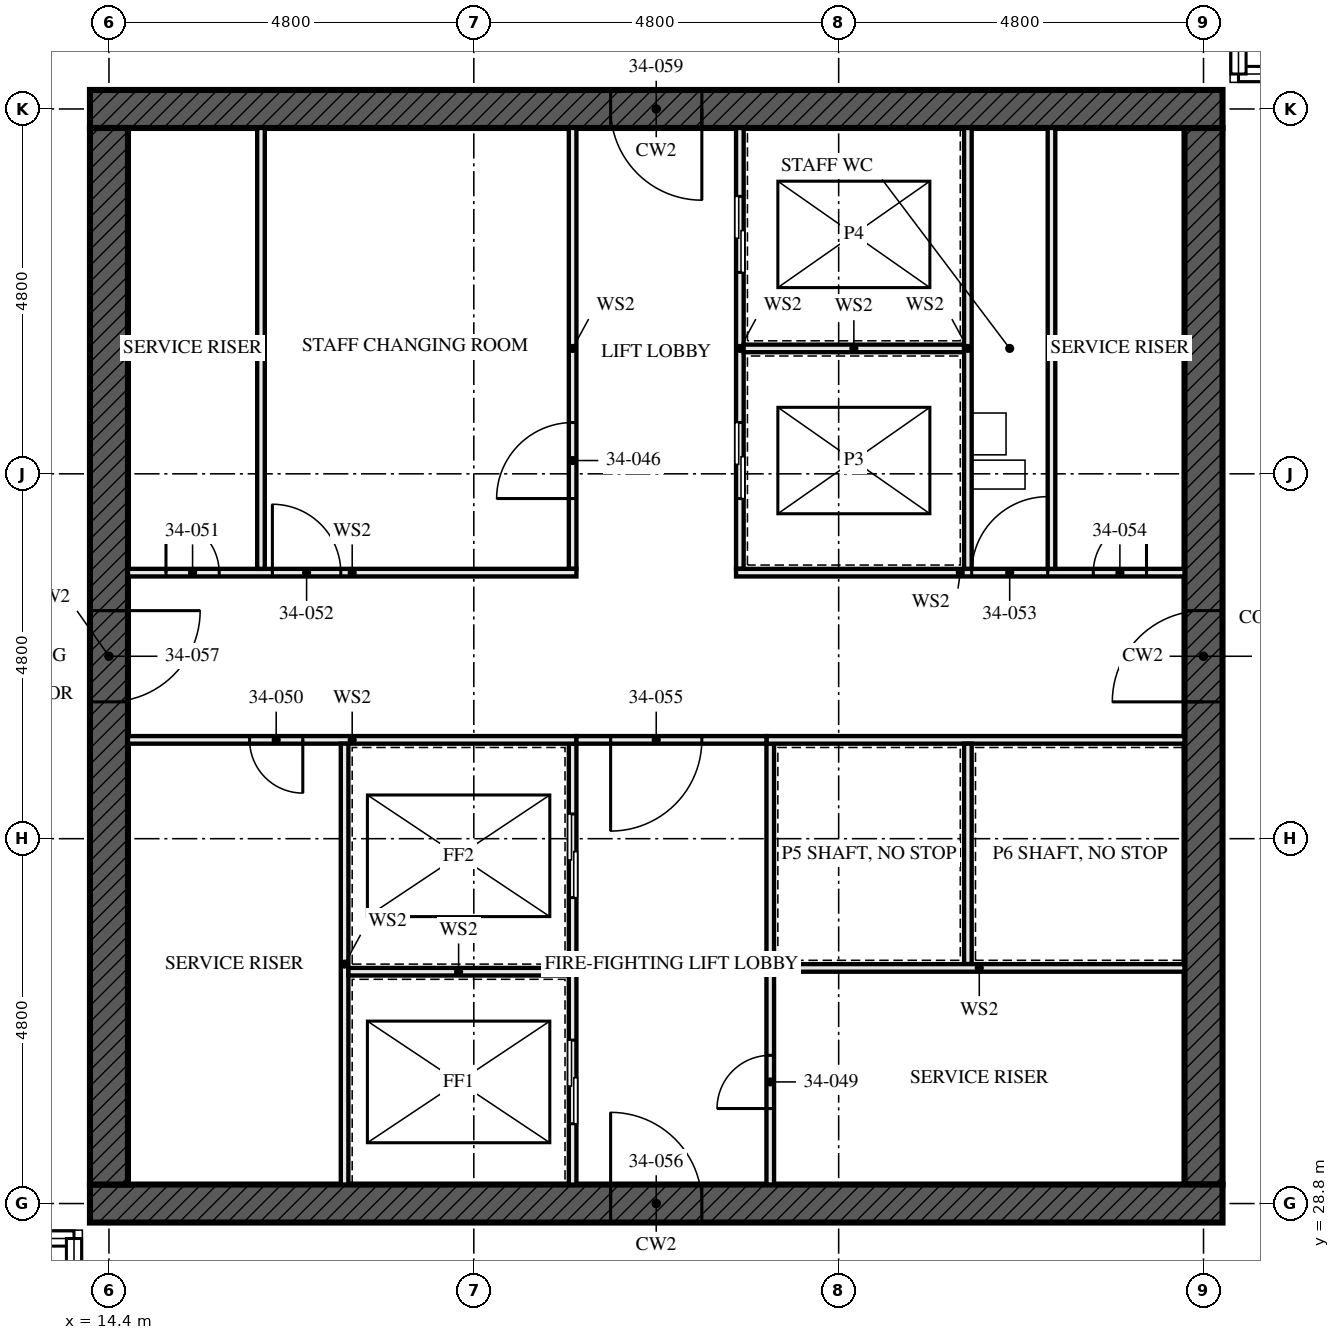
"""IFC4 building model, lengths in metres.
Left out: names, types, materials, properties, quantities, classifications, styles, units other than length and angle.
Written with IfcOpenShell. Run it as: python <this file> out.ifc"""

import sys

from ifc_helpers import new_model, si_unit, direction, frame, frame_2d, origin, place, context, subcontext, project, spatial, rectangle, extrude, element, fill, save


model = new_model("IFC4")
c1 = context("Model", 3, precision=1e-05, world=origin(), true_north=direction((0.0, 1.0)))
c2 = subcontext(c1, "Body", "Model", "MODEL_VIEW")
j1 = project(units=[si_unit("LENGTHUNIT", "METRE"), si_unit("PLANEANGLEUNIT", "RADIAN")], contexts=[c1])
p1 = place(None, origin())
s1 = spatial("IfcSite", under=j1, at=p1, CompositionType="ELEMENT")
p2 = place(p1, origin())
s2 = spatial("IfcBuilding", under=s1, at=p2, CompositionType="ELEMENT")
p3 = place(p2, frame((0.0, 0.0, 126.0)))
s3 = spatial("IfcBuildingStorey", under=s2, at=p3, CompositionType="ELEMENT", Elevation=126.0)
p4 = place(p3, frame((14.15, 28.8, -0.17), z_axis=(0.0, 0.0, 1.0), x_axis=(1.0, 0.0, 0.0)))
e1 = element("IfcWall", 1, at=p4, inside=s3, PredefinedType="SHEAR", context=c2, shape_type="SweptSolid", body=[
    extrude(rectangle(XDim=14.9, YDim=0.5, at=frame_2d((7.45, 0.0))), origin(), (0.0, 0.0, 1.0), 3.5),
])
p5 = place(p4, frame((6.85, 0.0, 0.17)))
e2 = element("IfcOpeningElement", 2, at=p5, cuts=e1, PredefinedType="OPENING", context=c2, shape_type="SweptSolid", body=[
    extrude(rectangle(XDim=1.2, YDim=2.1, at=frame_2d((0.6, 1.05))), frame((0.0, 0.26, 0.0), z_axis=(0.0, -1.0, 0.0), x_axis=(1.0, 0.0, 0.0)), (0.0, 0.0, 1.0), 0.521),
])
p6 = place(p3, frame((29.05, 43.2, -0.17), z_axis=(0.0, 0.0, 1.0), x_axis=(-1.0, 0.0, 0.0)))
e3 = element("IfcWall", 3, at=p6, inside=s3, PredefinedType="SHEAR", context=c2, shape_type="SweptSolid", body=[
    extrude(rectangle(XDim=14.9, YDim=0.5, at=frame_2d((7.45, 0.0))), origin(), (0.0, 0.0, 1.0), 3.5),
])
p7 = place(p6, frame((6.85, 0.0, 0.17)))
e4 = element("IfcOpeningElement", 4, at=p7, cuts=e3, PredefinedType="OPENING", context=c2, shape_type="SweptSolid", body=[
    extrude(rectangle(XDim=1.2, YDim=2.1, at=frame_2d((0.6, 1.05))), frame((0.0, 0.26, 0.0), z_axis=(0.0, -1.0, 0.0), x_axis=(1.0, 0.0, 0.0)), (0.0, 0.0, 1.0), 0.521),
])
p8 = place(p3, frame((14.4, 42.95, -0.17), z_axis=(0.0, 0.0, 1.0), x_axis=(0.0, -1.0, 0.0)))
e5 = element("IfcWall", 5, at=p8, inside=s3, PredefinedType="SHEAR", context=c2, shape_type="SweptSolid", body=[
    extrude(rectangle(XDim=13.9, YDim=0.5, at=frame_2d((6.95, 0.0))), origin(), (0.0, 0.0, 1.0), 3.5),
])
p9 = place(p8, frame((6.35, 0.0, 0.17)))
e6 = element("IfcOpeningElement", 6, at=p9, cuts=e5, PredefinedType="OPENING", context=c2, shape_type="SweptSolid", body=[
    extrude(rectangle(XDim=1.2, YDim=2.1, at=frame_2d((0.6, 1.05))), frame((0.0, 0.26, 0.0), z_axis=(0.0, -1.0, 0.0), x_axis=(1.0, 0.0, 0.0)), (0.0, 0.0, 1.0), 0.521),
])
p10 = place(p3, frame((28.8, 29.05, -0.17), z_axis=(0.0, 0.0, 1.0), x_axis=(0.0, 1.0, 0.0)))
e7 = element("IfcWall", 7, at=p10, inside=s3, PredefinedType="SHEAR", context=c2, shape_type="SweptSolid", body=[
    extrude(rectangle(XDim=13.9, YDim=0.5, at=frame_2d((6.95, 0.0))), origin(), (0.0, 0.0, 1.0), 3.5),
])
p11 = place(p10, frame((6.35, 0.0, 0.17)))
e8 = element("IfcOpeningElement", 8, at=p11, cuts=e7, PredefinedType="OPENING", context=c2, shape_type="SweptSolid", body=[
    extrude(rectangle(XDim=1.2, YDim=2.1, at=frame_2d((0.6, 1.05))), frame((0.0, 0.26, 0.0), z_axis=(0.0, -1.0, 0.0), x_axis=(1.0, 0.0, 0.0)), (0.0, 0.0, 1.0), 0.521),
])
for number, where, z_axis, x_axis in (
    (9, (16.4, 37.15, 0.0), (0.0, 0.0, 1.0), (0.0, 1.0, 0.0)),
    (10, (26.8, 37.15, 0.0), (0.0, 0.0, 1.0), (0.0, 1.0, 0.0)),
):
    element("IfcWall", number, at=place(p3, frame(where, z_axis=z_axis, x_axis=x_axis)), inside=s3, PredefinedType="SOLIDWALL", context=c2, shape_type="SweptSolid", body=[
        extrude(rectangle(XDim=5.8, YDim=0.1, at=frame_2d((2.9, 0.0))), origin(), (0.0, 0.0, 1.0), 3.33),
    ])
p12 = place(p3, frame((20.5, 29.05, 0.0), z_axis=(0.0, 0.0, 1.0), x_axis=(0.0, 1.0, 0.0)))
e11 = element("IfcWall", 11, at=p12, inside=s3, PredefinedType="SOLIDWALL", context=c2, shape_type="SweptSolid", body=[
    extrude(rectangle(XDim=5.8, YDim=0.1, at=frame_2d((2.9, 0.0))), origin(), (0.0, 0.0, 1.0), 3.33),
])
p13 = place(p12, frame((0.8, 0.0, 0.0)))
e12 = element("IfcOpeningElement", 12, at=p13, cuts=e11, PredefinedType="OPENING", context=c2, shape_type="SweptSolid", body=[
    extrude(rectangle(XDim=1.1, YDim=2.3, at=frame_2d((0.55, 1.15))), frame((0.0, 0.061, 0.0), z_axis=(0.0, -1.0, 0.0), x_axis=(1.0, 0.0, 0.0)), (0.0, 0.0, 1.0), 0.121),
])
p14 = place(p12, frame((3.775, 0.0, 0.0)))
e13 = element("IfcOpeningElement", 13, at=p14, cuts=e11, PredefinedType="OPENING", context=c2, shape_type="SweptSolid", body=[
    extrude(rectangle(XDim=1.1, YDim=2.3, at=frame_2d((0.55, 1.15))), frame((0.0, 0.061, 0.0), z_axis=(0.0, -1.0, 0.0), x_axis=(1.0, 0.0, 0.0)), (0.0, 0.0, 1.0), 0.121),
])
p15 = place(p3, frame((20.5, 37.15, 0.0), z_axis=(0.0, 0.0, 1.0), x_axis=(0.0, 1.0, 0.0)))
e14 = element("IfcWall", 14, at=p15, inside=s3, PredefinedType="SOLIDWALL", context=c2, shape_type="SweptSolid", body=[
    extrude(rectangle(XDim=5.8, YDim=0.1, at=frame_2d((2.9, 0.0))), origin(), (0.0, 0.0, 1.0), 3.33),
])
p16 = place(p15, frame((0.925, 0.0, 0.0)))
e15 = element("IfcOpeningElement", 15, at=p16, cuts=e14, PredefinedType="OPENING", context=c2, shape_type="SweptSolid", body=[
    extrude(rectangle(XDim=1.0, YDim=2.1, at=frame_2d((0.5, 1.05))), frame((0.0, 0.061, 0.0), z_axis=(0.0, -1.0, 0.0), x_axis=(1.0, 0.0, 0.0)), (0.0, 0.0, 1.0), 0.121),
])
p17 = place(p3, frame((22.7, 37.15, 0.0), z_axis=(0.0, 0.0, 1.0), x_axis=(0.0, 1.0, 0.0)))
e16 = element("IfcWall", 16, at=p17, inside=s3, PredefinedType="SOLIDWALL", context=c2, shape_type="SweptSolid", body=[
    extrude(rectangle(XDim=5.8, YDim=0.1, at=frame_2d((2.9, 0.0))), origin(), (0.0, 0.0, 1.0), 3.33),
])
p18 = place(p17, frame((0.925, 0.0, 0.0)))
e17 = element("IfcOpeningElement", 17, at=p18, cuts=e16, PredefinedType="OPENING", context=c2, shape_type="SweptSolid", body=[
    extrude(rectangle(XDim=1.0, YDim=2.1, at=frame_2d((0.5, 1.05))), frame((0.0, 0.061, 0.0), z_axis=(0.0, -1.0, 0.0), x_axis=(1.0, 0.0, 0.0)), (0.0, 0.0, 1.0), 0.121),
])
p19 = place(p17, frame((3.9, 0.0, 0.0)))
e18 = element("IfcOpeningElement", 18, at=p19, cuts=e16, PredefinedType="OPENING", context=c2, shape_type="SweptSolid", body=[
    extrude(rectangle(XDim=1.0, YDim=2.1, at=frame_2d((0.5, 1.05))), frame((0.0, 0.061, 0.0), z_axis=(0.0, -1.0, 0.0), x_axis=(1.0, 0.0, 0.0)), (0.0, 0.0, 1.0), 0.121),
])
p20 = place(p3, frame((23.1, 29.05, 0.0), z_axis=(0.0, 0.0, 1.0), x_axis=(0.0, 1.0, 0.0)))
e19 = element("IfcWall", 19, at=p20, inside=s3, PredefinedType="SOLIDWALL", context=c2, shape_type="SweptSolid", body=[
    extrude(rectangle(XDim=5.8, YDim=0.1, at=frame_2d((2.9, 0.0))), origin(), (0.0, 0.0, 1.0), 3.33),
])
p21 = place(p20, frame((1.0, 0.0, 0.0)))
e20 = element("IfcOpeningElement", 20, at=p21, cuts=e19, PredefinedType="OPENING", context=c2, shape_type="SweptSolid", body=[
    extrude(rectangle(XDim=0.7, YDim=2.1, at=frame_2d((0.35, 1.05))), frame((0.0, 0.061, 0.0), z_axis=(0.0, -1.0, 0.0), x_axis=(1.0, 0.0, 0.0)), (0.0, 0.0, 1.0), 0.121),
])
p22 = place(p3, frame((14.65, 34.9, 0.0), z_axis=(0.0, 0.0, 1.0), x_axis=(1.0, 0.0, 0.0)))
e21 = element("IfcWall", 21, at=p22, inside=s3, PredefinedType="SOLIDWALL", context=c2, shape_type="SweptSolid", body=[
    extrude(rectangle(XDim=5.9, YDim=0.1, at=frame_2d((2.95, 0.0))), origin(), (0.0, 0.0, 1.0), 3.33),
])
p23 = place(p22, frame((1.6, 0.0, 0.0)))
e22 = element("IfcOpeningElement", 22, at=p23, cuts=e21, PredefinedType="OPENING", context=c2, shape_type="SweptSolid", body=[
    extrude(rectangle(XDim=0.7, YDim=2.1, at=frame_2d((0.35, 1.05))), frame((0.0, 0.061, 0.0), z_axis=(0.0, -1.0, 0.0), x_axis=(1.0, 0.0, 0.0)), (0.0, 0.0, 1.0), 0.121),
])
p24 = place(p3, frame((23.05, 34.9, 0.0), z_axis=(0.0, 0.0, 1.0), x_axis=(1.0, 0.0, 0.0)))
e23 = element("IfcWall", 23, at=p24, inside=s3, PredefinedType="SOLIDWALL", context=c2, shape_type="SweptSolid", body=[
    extrude(rectangle(XDim=5.5, YDim=0.1, at=frame_2d((2.75, 0.0))), origin(), (0.0, 0.0, 1.0), 3.33),
])
p25 = place(p3, frame((14.65, 37.1, 0.0), z_axis=(0.0, 0.0, 1.0), x_axis=(1.0, 0.0, 0.0)))
e24 = element("IfcWall", 24, at=p25, inside=s3, PredefinedType="SOLIDWALL", context=c2, shape_type="SweptSolid", body=[
    extrude(rectangle(XDim=5.9, YDim=0.1, at=frame_2d((2.95, 0.0))), origin(), (0.0, 0.0, 1.0), 3.33),
])
p26 = place(p25, frame((0.5, 0.0, 0.0)))
e25 = element("IfcOpeningElement", 25, at=p26, cuts=e24, PredefinedType="OPENING", context=c2, shape_type="SweptSolid", body=[
    extrude(rectangle(XDim=0.7, YDim=2.1, at=frame_2d((0.35, 1.05))), frame((0.0, 0.061, 0.0), z_axis=(0.0, -1.0, 0.0), x_axis=(1.0, 0.0, 0.0)), (0.0, 0.0, 1.0), 0.121),
])
p27 = place(p25, frame((1.9, 0.0, 0.0)))
e26 = element("IfcOpeningElement", 26, at=p27, cuts=e24, PredefinedType="OPENING", context=c2, shape_type="SweptSolid", body=[
    extrude(rectangle(XDim=0.9, YDim=2.1, at=frame_2d((0.45, 1.05))), frame((0.0, 0.061, 0.0), z_axis=(0.0, -1.0, 0.0), x_axis=(1.0, 0.0, 0.0)), (0.0, 0.0, 1.0), 0.121),
])
p28 = place(p3, frame((22.65, 37.1, 0.0), z_axis=(0.0, 0.0, 1.0), x_axis=(1.0, 0.0, 0.0)))
e27 = element("IfcWall", 27, at=p28, inside=s3, PredefinedType="SOLIDWALL", context=c2, shape_type="SweptSolid", body=[
    extrude(rectangle(XDim=5.9, YDim=0.1, at=frame_2d((2.95, 0.0))), origin(), (0.0, 0.0, 1.0), 3.33),
])
p29 = place(p28, frame((3.1, 0.0, 0.0)))
e28 = element("IfcOpeningElement", 28, at=p29, cuts=e27, PredefinedType="OPENING", context=c2, shape_type="SweptSolid", body=[
    extrude(rectangle(XDim=1.0, YDim=2.1, at=frame_2d((0.5, 1.05))), frame((0.0, 0.061, 0.0), z_axis=(0.0, -1.0, 0.0), x_axis=(1.0, 0.0, 0.0)), (0.0, 0.0, 1.0), 0.121),
])
p30 = place(p28, frame((4.7, 0.0, 0.0)))
e29 = element("IfcOpeningElement", 29, at=p30, cuts=e27, PredefinedType="OPENING", context=c2, shape_type="SweptSolid", body=[
    extrude(rectangle(XDim=0.7, YDim=2.1, at=frame_2d((0.35, 1.05))), frame((0.0, 0.061, 0.0), z_axis=(0.0, -1.0, 0.0), x_axis=(1.0, 0.0, 0.0)), (0.0, 0.0, 1.0), 0.121),
])
p31 = place(p3, frame((20.55, 34.9, 0.0), z_axis=(0.0, 0.0, 1.0), x_axis=(1.0, 0.0, 0.0)))
e30 = element("IfcWall", 30, at=p31, inside=s3, PredefinedType="SOLIDWALL", context=c2, shape_type="SweptSolid", body=[
    extrude(rectangle(XDim=2.5, YDim=0.1, at=frame_2d((1.25, 0.0))), origin(), (0.0, 0.0, 1.0), 3.33),
])
p32 = place(p31, frame((0.45, 0.0, 0.0)))
e31 = element("IfcOpeningElement", 31, at=p32, cuts=e30, PredefinedType="OPENING", context=c2, shape_type="SweptSolid", body=[
    extrude(rectangle(XDim=1.2, YDim=2.1, at=frame_2d((0.6, 1.05))), frame((0.0, 0.061, 0.0), z_axis=(0.0, -1.0, 0.0), x_axis=(1.0, 0.0, 0.0)), (0.0, 0.0, 1.0), 0.121),
])
p33 = place(p3, frame((17.5, 29.05, 0.0), z_axis=(0.0, 0.0, 1.0), x_axis=(0.0, 1.0, 0.0)))
e32 = element("IfcWall", 32, at=p33, inside=s3, PredefinedType="SOLIDWALL", context=c2, shape_type="SweptSolid", body=[
    extrude(rectangle(XDim=5.8, YDim=0.1, at=frame_2d((2.9, 0.0))), origin(), (0.0, 0.0, 1.0), 3.33),
])
for number, where, z_axis, x_axis in (
    (33, (17.55, 31.85, 0.0), (0.0, 0.0, 1.0), (1.0, 0.0, 0.0)),
    (34, (22.75, 40.05, 0.0), (0.0, 0.0, 1.0), (1.0, 0.0, 0.0)),
):
    element("IfcWall", number, at=place(p3, frame(where, z_axis=z_axis, x_axis=x_axis)), inside=s3, PredefinedType="SOLIDWALL", context=c2, shape_type="SweptSolid", body=[
        extrude(rectangle(XDim=2.9, YDim=0.1, at=frame_2d((1.45, 0.0))), origin(), (0.0, 0.0, 1.0), 3.33),
    ])
p34 = place(p3, frame((25.7, 37.15, 0.0), z_axis=(0.0, 0.0, 1.0), x_axis=(0.0, 1.0, 0.0)))
e35 = element("IfcWall", 35, at=p34, inside=s3, PredefinedType="SOLIDWALL", context=c2, shape_type="SweptSolid", body=[
    extrude(rectangle(XDim=5.8, YDim=0.1, at=frame_2d((2.9, 0.0))), origin(), (0.0, 0.0, 1.0), 3.33),
])
p35 = place(p3, frame((25.7, 31.95, 0.0), z_axis=(0.0, 0.0, 1.0), x_axis=(0.0, 1.0, 0.0)))
e36 = element("IfcWall", 36, at=p35, inside=s3, PredefinedType="SOLIDWALL", context=c2, shape_type="SweptSolid", body=[
    extrude(rectangle(XDim=2.9, YDim=0.1, at=frame_2d((1.45, 0.0))), origin(), (0.0, 0.0, 1.0), 3.33),
])
p36 = place(p3, frame((23.15, 31.9, 0.0), z_axis=(0.0, 0.0, 1.0), x_axis=(1.0, 0.0, 0.0)))
e37 = element("IfcWall", 37, at=p36, inside=s3, PredefinedType="SOLIDWALL", context=c2, shape_type="SweptSolid", body=[
    extrude(rectangle(XDim=5.4, YDim=0.1, at=frame_2d((2.7, 0.0))), origin(), (0.0, 0.0, 1.0), 3.33),
])
p37 = place(p13, origin())
e38 = element("IfcDoor", 38, at=p37, inside=s3, OperationType="SLIDING_TO_LEFT", PredefinedType="DOOR", context=c2, shape_type="SweptSolid", body=[
    extrude(rectangle(XDim=1.1, YDim=2.3, at=frame_2d((0.55, 1.15))), frame((0.0, 0.05, 0.0), z_axis=(0.0, -1.0, 0.0), x_axis=(1.0, 0.0, 0.0)), (0.0, 0.0, 1.0), 0.1),
])
fill(e12, e38)
p38 = place(p14, origin())
e39 = element("IfcDoor", 39, at=p38, inside=s3, OperationType="SLIDING_TO_LEFT", PredefinedType="DOOR", context=c2, shape_type="SweptSolid", body=[
    extrude(rectangle(XDim=1.1, YDim=2.3, at=frame_2d((0.55, 1.15))), frame((0.0, 0.05, 0.0), z_axis=(0.0, -1.0, 0.0), x_axis=(1.0, 0.0, 0.0)), (0.0, 0.0, 1.0), 0.1),
])
fill(e13, e39)
p39 = place(p16, origin())
e40 = element("IfcDoor", 40, at=p39, inside=s3, OperationType="SINGLE_SWING_RIGHT", PredefinedType="DOOR", context=c2, shape_type="SweptSolid", body=[
    extrude(rectangle(XDim=1.0, YDim=2.1, at=frame_2d((0.5, 1.05))), frame((0.0, 0.027, 0.0), z_axis=(0.0, -1.0, 0.0), x_axis=(1.0, 0.0, 0.0)), (0.0, 0.0, 1.0), 0.054),
])
fill(e15, e40)
p40 = place(p18, origin())
e41 = element("IfcDoor", 41, at=p40, inside=s3, OperationType="SLIDING_TO_LEFT", PredefinedType="DOOR", context=c2, shape_type="SweptSolid", body=[
    extrude(rectangle(XDim=1.0, YDim=2.1, at=frame_2d((0.5, 1.05))), frame((0.0, 0.05, 0.0), z_axis=(0.0, -1.0, 0.0), x_axis=(1.0, 0.0, 0.0)), (0.0, 0.0, 1.0), 0.1),
])
fill(e17, e41)
p41 = place(p19, origin())
e42 = element("IfcDoor", 42, at=p41, inside=s3, OperationType="SLIDING_TO_LEFT", PredefinedType="DOOR", context=c2, shape_type="SweptSolid", body=[
    extrude(rectangle(XDim=1.0, YDim=2.1, at=frame_2d((0.5, 1.05))), frame((0.0, 0.05, 0.0), z_axis=(0.0, -1.0, 0.0), x_axis=(1.0, 0.0, 0.0)), (0.0, 0.0, 1.0), 0.1),
])
fill(e18, e42)
p42 = place(p21, origin())
e43 = element("IfcDoor", 43, at=p42, inside=s3, OperationType="SINGLE_SWING_RIGHT", PredefinedType="DOOR", context=c2, shape_type="SweptSolid", body=[
    extrude(rectangle(XDim=0.7, YDim=2.1, at=frame_2d((0.35, 1.05))), frame((0.0, 0.027, 0.0), z_axis=(0.0, -1.0, 0.0), x_axis=(1.0, 0.0, 0.0)), (0.0, 0.0, 1.0), 0.054),
])
fill(e20, e43)
p43 = place(p23, frame((0.7, 0.0, 0.0), z_axis=(0.0, 0.0, 1.0), x_axis=(-1.0, 0.0, 0.0)))
e44 = element("IfcDoor", 44, at=p43, inside=s3, OperationType="SINGLE_SWING_RIGHT", PredefinedType="DOOR", context=c2, shape_type="SweptSolid", body=[
    extrude(rectangle(XDim=0.7, YDim=2.1, at=frame_2d((0.35, 1.05))), frame((0.0, 0.027, 0.0), z_axis=(0.0, -1.0, 0.0), x_axis=(1.0, 0.0, 0.0)), (0.0, 0.0, 1.0), 0.054),
])
fill(e22, e44)
p44 = place(p26, origin())
e45 = element("IfcDoor", 45, at=p44, inside=s3, OperationType="SINGLE_SWING_RIGHT", PredefinedType="DOOR", context=c2, shape_type="SweptSolid", body=[
    extrude(rectangle(XDim=0.7, YDim=2.1, at=frame_2d((0.35, 1.05))), frame((0.0, 0.027, 0.0), z_axis=(0.0, -1.0, 0.0), x_axis=(1.0, 0.0, 0.0)), (0.0, 0.0, 1.0), 0.054),
])
fill(e25, e45)
p45 = place(p27, origin())
e46 = element("IfcDoor", 46, at=p45, inside=s3, OperationType="SINGLE_SWING_RIGHT", PredefinedType="DOOR", context=c2, shape_type="SweptSolid", body=[
    extrude(rectangle(XDim=0.9, YDim=2.1, at=frame_2d((0.45, 1.05))), frame((0.0, 0.027, 0.0), z_axis=(0.0, -1.0, 0.0), x_axis=(1.0, 0.0, 0.0)), (0.0, 0.0, 1.0), 0.054),
])
fill(e26, e46)
p46 = place(p29, origin())
e47 = element("IfcDoor", 47, at=p46, inside=s3, OperationType="SINGLE_SWING_LEFT", PredefinedType="DOOR", context=c2, shape_type="SweptSolid", body=[
    extrude(rectangle(XDim=1.0, YDim=2.1, at=frame_2d((0.5, 1.05))), frame((0.0, 0.027, 0.0), z_axis=(0.0, -1.0, 0.0), x_axis=(1.0, 0.0, 0.0)), (0.0, 0.0, 1.0), 0.054),
])
fill(e28, e47)
p47 = place(p30, origin())
e48 = element("IfcDoor", 48, at=p47, inside=s3, OperationType="SINGLE_SWING_LEFT", PredefinedType="DOOR", context=c2, shape_type="SweptSolid", body=[
    extrude(rectangle(XDim=0.7, YDim=2.1, at=frame_2d((0.35, 1.05))), frame((0.0, 0.027, 0.0), z_axis=(0.0, -1.0, 0.0), x_axis=(1.0, 0.0, 0.0)), (0.0, 0.0, 1.0), 0.054),
])
fill(e29, e48)
p48 = place(p32, frame((1.2, 0.0, 0.0), z_axis=(0.0, 0.0, 1.0), x_axis=(-1.0, 0.0, 0.0)))
e49 = element("IfcDoor", 49, at=p48, inside=s3, OperationType="SINGLE_SWING_LEFT", PredefinedType="DOOR", context=c2, shape_type="SweptSolid", body=[
    extrude(rectangle(XDim=1.2, YDim=2.1, at=frame_2d((0.6, 1.05))), frame((0.0, 0.027, 0.0), z_axis=(0.0, -1.0, 0.0), x_axis=(1.0, 0.0, 0.0)), (0.0, 0.0, 1.0), 0.054),
])
fill(e31, e49)
p49 = place(p5, origin())
e50 = element("IfcDoor", 50, at=p49, inside=s3, OperationType="SINGLE_SWING_LEFT", PredefinedType="DOOR", context=c2, shape_type="SweptSolid", body=[
    extrude(rectangle(XDim=1.2, YDim=2.1, at=frame_2d((0.6, 1.05))), frame((0.0, 0.027, 0.0), z_axis=(0.0, -1.0, 0.0), x_axis=(1.0, 0.0, 0.0)), (0.0, 0.0, 1.0), 0.054),
])
fill(e2, e50)
p50 = place(p9, origin())
e51 = element("IfcDoor", 51, at=p50, inside=s3, OperationType="SINGLE_SWING_LEFT", PredefinedType="DOOR", context=c2, shape_type="SweptSolid", body=[
    extrude(rectangle(XDim=1.2, YDim=2.1, at=frame_2d((0.6, 1.05))), frame((0.0, 0.027, 0.0), z_axis=(0.0, -1.0, 0.0), x_axis=(1.0, 0.0, 0.0)), (0.0, 0.0, 1.0), 0.054),
])
fill(e6, e51)
p51 = place(p11, origin())
e52 = element("IfcDoor", 52, at=p51, inside=s3, OperationType="SINGLE_SWING_LEFT", PredefinedType="DOOR", context=c2, shape_type="SweptSolid", body=[
    extrude(rectangle(XDim=1.2, YDim=2.1, at=frame_2d((0.6, 1.05))), frame((0.0, 0.027, 0.0), z_axis=(0.0, -1.0, 0.0), x_axis=(1.0, 0.0, 0.0)), (0.0, 0.0, 1.0), 0.054),
])
fill(e8, e52)
p52 = place(p7, origin())
e53 = element("IfcDoor", 53, at=p52, inside=s3, OperationType="SINGLE_SWING_LEFT", PredefinedType="DOOR", context=c2, shape_type="SweptSolid", body=[
    extrude(rectangle(XDim=1.2, YDim=2.1, at=frame_2d((0.6, 1.05))), frame((0.0, 0.027, 0.0), z_axis=(0.0, -1.0, 0.0), x_axis=(1.0, 0.0, 0.0)), (0.0, 0.0, 1.0), 0.054),
])
fill(e4, e53)
save(model, sys.argv[1])
